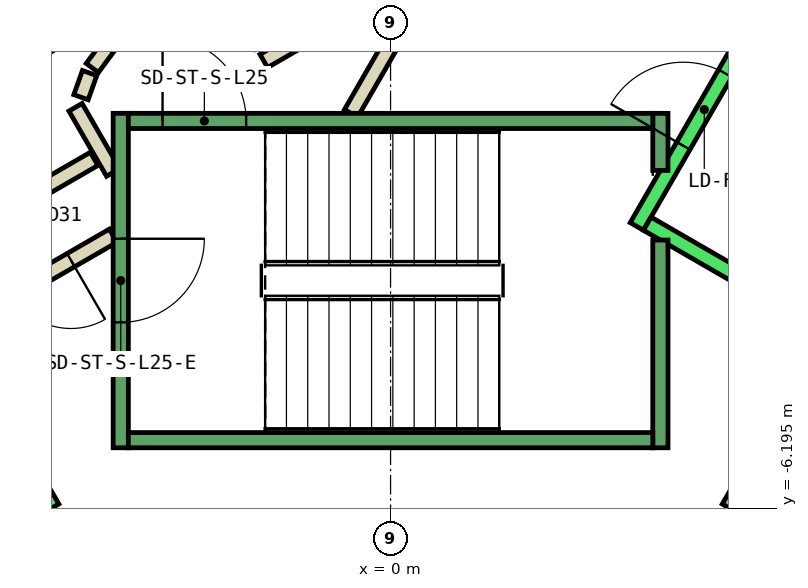
"""IFC4 building model, lengths in metres.
Left out: names, types, materials, properties, quantities, classifications, styles, units other than length and angle.
Written with IfcOpenShell. Run it as: python <this file> out.ifc"""

import sys

from ifc_helpers import new_model, si_unit, direction, frame, frame_2d, origin, place, context, subcontext, project, spatial, rectangle, extrude, element, fill, save


model = new_model("IFC4")
c1 = context("Model", 3, precision=1e-05, world=origin(), true_north=direction((0.0, 1.0)))
c2 = subcontext(c1, "Body", "Model", "MODEL_VIEW")
j1 = project(units=[si_unit("LENGTHUNIT", "METRE"), si_unit("PLANEANGLEUNIT", "RADIAN")], contexts=[c1])
p1 = place(None, origin())
s1 = spatial("IfcSite", under=j1, at=p1, CompositionType="ELEMENT")
p2 = place(p1, origin())
s2 = spatial("IfcBuilding", under=s1, at=p2, CompositionType="ELEMENT")
p3 = place(p2, frame((0.0, 0.0, 116.0)))
s3 = spatial("IfcBuildingStorey", under=s2, at=p3, CompositionType="ELEMENT", Elevation=116.0)
p4 = place(p3, frame((-3.9, -1.599, 0.0), z_axis=(0.0, 0.0, 1.0), x_axis=(-0.865969445389, -0.500096910261, 0.0)))
e1 = element("IfcWall", 1, at=p4, inside=s3, PredefinedType="PARTITIONING", context=c2, shape_type="SweptSolid", body=[
    extrude(rectangle(XDim=1.373, YDim=0.2, at=frame_2d((0.687, 0.0))), origin(), (0.0, 0.0, 1.0), 3.8),
])
p5 = place(p3, frame((-3.65, -2.61, 0.0), z_axis=(0.0, 0.0, 1.0), x_axis=(-0.866072462134, -0.499918483688, 0.0)))
e2 = element("IfcWall", 2, at=p5, inside=s3, PredefinedType="PARTITIONING", context=c2, shape_type="SweptSolid", body=[
    extrude(rectangle(XDim=2.084, YDim=0.2, at=frame_2d((1.042, 0.0))), origin(), (0.0, 0.0, 1.0), 3.8),
])
p6 = place(p5, frame((0.642, 0.0, 0.0)))
e3 = element("IfcOpeningElement", 3, at=p6, cuts=e2, PredefinedType="OPENING", context=c2, shape_type="SweptSolid", body=[
    extrude(rectangle(XDim=0.9, YDim=2.1, at=frame_2d((0.45, 1.05))), frame((0.0, 0.11, 0.0), z_axis=(0.0, -1.0, 0.0), x_axis=(1.0, 0.0, 0.0)), (0.0, 0.0, 1.0), 0.22),
])
p7 = place(p3, frame((-4.145, -0.92, 0.0), z_axis=(0.0, 0.0, 1.0), x_axis=(0.499743786207, -0.866173278362, 0.0)))
e4 = element("IfcWall", 4, at=p7, inside=s3, PredefinedType="PARTITIONING", context=c2, shape_type="SweptSolid", body=[
    extrude(rectangle(XDim=0.991, YDim=0.2, at=frame_2d((0.495, 0.0))), origin(), (0.0, 0.0, 1.0), 3.8),
])
p8 = place(p3, frame((-0.52, -1.0, 0.0), z_axis=(0.0, 0.0, 1.0), x_axis=(0.50011622646, 0.865958290007, 0.0)))
e5 = element("IfcWall", 5, at=p8, inside=s3, PredefinedType="PARTITIONING", context=c2, shape_type="SweptSolid", body=[
    extrude(rectangle(XDim=4.991, YDim=0.2, at=frame_2d((2.496, 0.0))), origin(), (0.0, 0.0, 1.0), 3.8),
])
p9 = place(p8, frame((1.945, 0.0, 0.0)))
e6 = element("IfcOpeningElement", 6, at=p9, cuts=e5, PredefinedType="OPENING", context=c2, shape_type="SweptSolid", body=[
    extrude(rectangle(XDim=1.0, YDim=2.1, at=frame_2d((0.5, 1.05))), frame((0.0, 0.11, 0.0), z_axis=(0.0, -1.0, 0.0), x_axis=(1.0, 0.0, 0.0)), (0.0, 0.0, 1.0), 0.22),
])
p10 = place(p3, frame((-0.412, 0.414, 0.0), z_axis=(0.0, 0.0, 1.0), x_axis=(-0.866017369001, -0.500013916395, 0.0)))
e7 = element("IfcWall", 7, at=p10, inside=s3, PredefinedType="PARTITIONING", context=c2, shape_type="SweptSolid", body=[
    extrude(rectangle(XDim=1.45, YDim=0.2, at=frame_2d((0.725, 0.0))), origin(), (0.0, 0.0, 1.0), 3.8),
])
p11 = place(p3, frame((-3.723, -0.131, 0.0), z_axis=(0.0, 0.0, 1.0), x_axis=(-0.594675113454, -0.803966112121, 0.0)))
e8 = element("IfcWall", 8, at=p11, inside=s3, PredefinedType="PARTITIONING", context=c2, shape_type="SweptSolid", body=[
    extrude(rectangle(XDim=0.338, YDim=0.2, at=frame_2d((0.169, 0.0))), origin(), (0.0, 0.0, 1.0), 3.8),
])
p12 = place(p3, frame((-3.96, -0.47, 0.0), z_axis=(0.0, 0.0, 1.0), x_axis=(-0.334824194261, -0.942280615813, 0.0)))
e9 = element("IfcWall", 9, at=p12, inside=s3, PredefinedType="PARTITIONING", context=c2, shape_type="SweptSolid", body=[
    extrude(rectangle(XDim=0.338, YDim=0.2, at=frame_2d((0.169, 0.0))), origin(), (0.0, 0.0, 1.0), 3.8),
])
p13 = place(p3, frame((-9.751, 2.99, 0.0), z_axis=(0.0, 0.0, 1.0), x_axis=(0.50000090737, -0.866024879913, 0.0)))
e10 = element("IfcWall", 10, at=p13, inside=s3, PredefinedType="STANDARD", context=c2, shape_type="SweptSolid", body=[
    extrude(rectangle(XDim=10.6, YDim=0.2, at=frame_2d((5.3, 0.0))), origin(), (0.0, 0.0, 1.0), 3.8),
])
p14 = place(p3, frame((3.24, -2.488, 0.0), z_axis=(0.0, 0.0, 1.0), x_axis=(0.49994636267, 0.866056369097, 0.0)))
e11 = element("IfcWall", 11, at=p14, inside=s3, PredefinedType="STANDARD", context=c2, shape_type="SweptSolid", body=[
    extrude(rectangle(XDim=2.8, YDim=0.2, at=frame_2d((1.4, 0.0))), origin(), (0.0, 0.0, 1.0), 3.8),
])
p15 = place(p14, frame((1.225, 0.0, 0.0)))
e12 = element("IfcOpeningElement", 12, at=p15, cuts=e11, PredefinedType="OPENING", context=c2, shape_type="SweptSolid", body=[
    extrude(rectangle(XDim=1.1, YDim=2.1, at=frame_2d((0.55, 1.05))), frame((0.0, 0.11, 0.0), z_axis=(0.0, -1.0, 0.0), x_axis=(1.0, 0.0, 0.0)), (0.0, 0.0, 1.0), 0.22),
])
p16 = place(p3, frame((3.377, -2.452, 0.0), z_axis=(0.0, 0.0, 1.0), x_axis=(0.865955154139, -0.50012165622, 0.0)))
e13 = element("IfcWall", 13, at=p16, inside=s3, PredefinedType="STANDARD", context=c2, shape_type="SweptSolid", body=[
    extrude(rectangle(XDim=2.4, YDim=0.2, at=frame_2d((1.2, 0.0))), origin(), (0.0, 0.0, 1.0), 3.8),
])
p17 = place(p3, frame((4.451, -6.19, 0.0), z_axis=(0.0, 0.0, 1.0), x_axis=(0.50000090737, 0.866024879913, 0.0)))
e14 = element("IfcWall", 14, at=p17, inside=s3, PredefinedType="STANDARD", context=c2, shape_type="SweptSolid", body=[
    extrude(rectangle(XDim=10.6, YDim=0.2, at=frame_2d((5.3, 0.0))), origin(), (0.0, 0.0, 1.0), 3.8),
])
p18 = place(p3, frame((-3.55, -1.0, 0.0), z_axis=(0.0, 0.0, 1.0), x_axis=(0.0, -1.0, 0.0)))
e15 = element("IfcWall", 15, at=p18, inside=s3, PredefinedType="STANDARD", context=c2, shape_type="SweptSolid", body=[
    extrude(rectangle(XDim=4.4, YDim=0.2, at=frame_2d((2.2, 0.0))), origin(), (0.0, 0.0, 1.0), 3.8),
])
p19 = place(p18, frame((1.65, 0.0, 0.0)))
e16 = element("IfcOpeningElement", 16, at=p19, cuts=e15, PredefinedType="OPENING", context=c2, shape_type="SweptSolid", body=[
    extrude(rectangle(XDim=1.1, YDim=2.2, at=frame_2d((0.55, 1.1))), frame((0.0, 0.11, 0.0), z_axis=(0.0, -1.0, 0.0), x_axis=(1.0, 0.0, 0.0)), (0.0, 0.0, 1.0), 0.22),
])
p20 = place(p3, frame((3.55, -2.667, 0.0), z_axis=(0.0, 0.0, 1.0), x_axis=(0.0, -1.0, 0.0)))
e17 = element("IfcWall", 17, at=p20, inside=s3, PredefinedType="STANDARD", context=c2, shape_type="SweptSolid", body=[
    extrude(rectangle(XDim=2.733, YDim=0.2, at=frame_2d((1.366, 0.0))), origin(), (0.0, 0.0, 1.0), 3.8),
])
p21 = place(p3, frame((3.55, -1.0, 0.0), z_axis=(0.0, 0.0, 1.0), x_axis=(0.0, -1.0, 0.0)))
e18 = element("IfcWall", 18, at=p21, inside=s3, PredefinedType="STANDARD", context=c2, shape_type="SweptSolid", body=[
    extrude(rectangle(XDim=0.751, YDim=0.2, at=frame_2d((0.375, 0.0))), origin(), (0.0, 0.0, 1.0), 3.8),
])
p22 = place(p3, frame((-3.45, -1.1, 0.0), z_axis=(0.0, 0.0, 1.0), x_axis=(1.0, 0.0, 0.0)))
e19 = element("IfcWall", 19, at=p22, inside=s3, PredefinedType="STANDARD", context=c2, shape_type="SweptSolid", body=[
    extrude(rectangle(XDim=6.9, YDim=0.2, at=frame_2d((3.45, 0.0))), origin(), (0.0, 0.0, 1.0), 3.8),
])
p23 = place(p22, frame((0.45, 0.0, 0.0)))
e20 = element("IfcOpeningElement", 20, at=p23, cuts=e19, PredefinedType="OPENING", context=c2, shape_type="SweptSolid", body=[
    extrude(rectangle(XDim=1.1, YDim=2.2, at=frame_2d((0.55, 1.1))), frame((0.0, 0.11, 0.0), z_axis=(0.0, -1.0, 0.0), x_axis=(1.0, 0.0, 0.0)), (0.0, 0.0, 1.0), 0.22),
])
p24 = place(p3, frame((-3.45, -5.3, 0.0), z_axis=(0.0, 0.0, 1.0), x_axis=(1.0, 0.0, 0.0)))
e21 = element("IfcWall", 21, at=p24, inside=s3, PredefinedType="STANDARD", context=c2, shape_type="SweptSolid", body=[
    extrude(rectangle(XDim=6.9, YDim=0.2, at=frame_2d((3.45, 0.0))), origin(), (0.0, 0.0, 1.0), 3.8),
])
p25 = place(p6, origin())
e22 = element("IfcDoor", 22, at=p25, inside=s3, OperationType="SINGLE_SWING_LEFT", PredefinedType="DOOR", context=c2, shape_type="SweptSolid", body=[
    extrude(rectangle(XDim=0.9, YDim=2.1, at=frame_2d((0.45, 1.05))), frame((0.0, 0.025, 0.0), z_axis=(0.0, -1.0, 0.0), x_axis=(1.0, 0.0, 0.0)), (0.0, 0.0, 1.0), 0.05),
])
fill(e3, e22)
p26 = place(p15, origin())
e23 = element("IfcDoor", 23, at=p26, inside=s3, OperationType="SLIDING_TO_LEFT", PredefinedType="DOOR", context=c2, shape_type="SweptSolid", body=[
    extrude(rectangle(XDim=1.1, YDim=2.1, at=frame_2d((0.55, 1.05))), frame((0.0, 0.025, 0.0), z_axis=(0.0, -1.0, 0.0), x_axis=(1.0, 0.0, 0.0)), (0.0, 0.0, 1.0), 0.05),
])
fill(e12, e23)
p27 = place(p23, origin())
e24 = element("IfcDoor", 24, at=p27, inside=s3, OperationType="SINGLE_SWING_LEFT", PredefinedType="DOOR", context=c2, shape_type="SweptSolid", body=[
    extrude(rectangle(XDim=1.1, YDim=2.2, at=frame_2d((0.55, 1.1))), frame((0.0, 0.025, 0.0), z_axis=(0.0, -1.0, 0.0), x_axis=(1.0, 0.0, 0.0)), (0.0, 0.0, 1.0), 0.05),
])
fill(e20, e24)
p28 = place(p19, origin())
e25 = element("IfcDoor", 25, at=p28, inside=s3, OperationType="SINGLE_SWING_LEFT", PredefinedType="DOOR", context=c2, shape_type="SweptSolid", body=[
    extrude(rectangle(XDim=1.1, YDim=2.2, at=frame_2d((0.55, 1.1))), frame((0.0, 0.025, 0.0), z_axis=(0.0, -1.0, 0.0), x_axis=(1.0, 0.0, 0.0)), (0.0, 0.0, 1.0), 0.05),
])
fill(e16, e25)
save(model, sys.argv[1])
